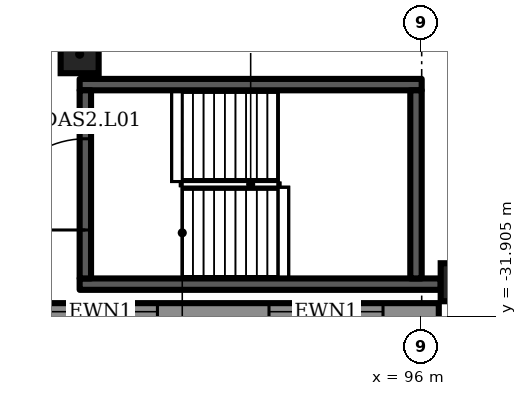
"""IFC4 building model, lengths in metres.
Left out: names, types, materials, properties, quantities, classifications, styles, units other than length and angle.
Written with IfcOpenShell. Run it as: python <this file> out.ifc"""

import sys

from ifc_helpers import new_model, si_unit, direction, frame, frame_2d, origin, origin_2d, place, context, subcontext, project, spatial, rectangle, extrude, element, fill, save


model = new_model("IFC4")
c1 = context("Model", 3, precision=1e-05, world=origin(), true_north=direction((0.0, 1.0)))
c2 = subcontext(c1, "Body", "Model", "MODEL_VIEW")
j1 = project(units=[si_unit("LENGTHUNIT", "METRE"), si_unit("PLANEANGLEUNIT", "RADIAN")], contexts=[c1])
p1 = place(None, origin())
s1 = spatial("IfcSite", under=j1, at=p1, CompositionType="ELEMENT")
p2 = place(p1, origin())
s2 = spatial("IfcBuilding", under=s1, at=p2, CompositionType="ELEMENT")
p3 = place(p2, frame((0.0, 0.0, 8.0)))
s3 = spatial("IfcBuildingStorey", under=s2, at=p3, CompositionType="ELEMENT", Elevation=8.0)
for number, where, z_axis, x_axis in (
    (1, (97.0, -31.0, 0.0), (0.0, 0.0, 1.0), (1.0, 0.0, 0.0)),
    (2, (87.0, -25.0, 0.0), (0.0, 0.0, 1.0), (1.0, 0.0, 0.0)),
):
    element("IfcColumn", number, at=place(p3, frame(where, z_axis=z_axis, x_axis=x_axis)), inside=s3, PredefinedType="COLUMN", context=c2, shape_type="SweptSolid", body=[
        extrude(rectangle(XDim=1.0, YDim=1.0, at=origin_2d()), origin(), (0.0, 0.0, 1.0), 7.0),
    ])
p4 = place(p3, frame((-4.45, -31.775, 0.0), z_axis=(0.0, 0.0, 1.0), x_axis=(1.0, 0.0, 0.0)))
e3 = element("IfcWall", 3, at=p4, inside=s3, PredefinedType="SOLIDWALL", context=c2, shape_type="SweptSolid", body=[
    extrude(rectangle(XDim=100.9, YDim=0.45, at=frame_2d((50.45, 0.0))), origin(), (0.0, 0.0, 1.0), 6.7),
])
p5 = place(p4, frame((1.468, 0.0, 1.0)))
e4 = element("IfcOpeningElement", 4, at=p5, cuts=e3, PredefinedType="OPENING", context=c2, shape_type="SweptSolid", body=[
    extrude(rectangle(XDim=3.0, YDim=4.7, at=frame_2d((1.5, 2.35))), frame((0.0, 0.235, 0.0), z_axis=(0.0, -1.0, 0.0), x_axis=(1.0, 0.0, 0.0)), (0.0, 0.0, 1.0), 0.47),
])
p6 = place(p4, frame((7.403, 0.0, 1.0)))
e5 = element("IfcOpeningElement", 5, at=p6, cuts=e3, PredefinedType="OPENING", context=c2, shape_type="SweptSolid", body=[
    extrude(rectangle(XDim=3.0, YDim=4.7, at=frame_2d((1.5, 2.35))), frame((0.0, 0.235, 0.0), z_axis=(0.0, -1.0, 0.0), x_axis=(1.0, 0.0, 0.0)), (0.0, 0.0, 1.0), 0.47),
])
p7 = place(p4, frame((13.338, 0.0, 1.0)))
e6 = element("IfcOpeningElement", 6, at=p7, cuts=e3, PredefinedType="OPENING", context=c2, shape_type="SweptSolid", body=[
    extrude(rectangle(XDim=3.0, YDim=4.7, at=frame_2d((1.5, 2.35))), frame((0.0, 0.235, 0.0), z_axis=(0.0, -1.0, 0.0), x_axis=(1.0, 0.0, 0.0)), (0.0, 0.0, 1.0), 0.47),
])
p8 = place(p4, frame((19.273, 0.0, 1.0)))
e7 = element("IfcOpeningElement", 7, at=p8, cuts=e3, PredefinedType="OPENING", context=c2, shape_type="SweptSolid", body=[
    extrude(rectangle(XDim=3.0, YDim=4.7, at=frame_2d((1.5, 2.35))), frame((0.0, 0.235, 0.0), z_axis=(0.0, -1.0, 0.0), x_axis=(1.0, 0.0, 0.0)), (0.0, 0.0, 1.0), 0.47),
])
p9 = place(p4, frame((25.209, 0.0, 1.0)))
e8 = element("IfcOpeningElement", 8, at=p9, cuts=e3, PredefinedType="OPENING", context=c2, shape_type="SweptSolid", body=[
    extrude(rectangle(XDim=3.0, YDim=4.7, at=frame_2d((1.5, 2.35))), frame((0.0, 0.235, 0.0), z_axis=(0.0, -1.0, 0.0), x_axis=(1.0, 0.0, 0.0)), (0.0, 0.0, 1.0), 0.47),
])
p10 = place(p4, frame((31.144, 0.0, 1.0)))
e9 = element("IfcOpeningElement", 9, at=p10, cuts=e3, PredefinedType="OPENING", context=c2, shape_type="SweptSolid", body=[
    extrude(rectangle(XDim=3.0, YDim=4.7, at=frame_2d((1.5, 2.35))), frame((0.0, 0.235, 0.0), z_axis=(0.0, -1.0, 0.0), x_axis=(1.0, 0.0, 0.0)), (0.0, 0.0, 1.0), 0.47),
])
p11 = place(p4, frame((37.079, 0.0, 1.0)))
e10 = element("IfcOpeningElement", 10, at=p11, cuts=e3, PredefinedType="OPENING", context=c2, shape_type="SweptSolid", body=[
    extrude(rectangle(XDim=3.0, YDim=4.7, at=frame_2d((1.5, 2.35))), frame((0.0, 0.235, 0.0), z_axis=(0.0, -1.0, 0.0), x_axis=(1.0, 0.0, 0.0)), (0.0, 0.0, 1.0), 0.47),
])
p12 = place(p4, frame((43.015, 0.0, 1.0)))
e11 = element("IfcOpeningElement", 11, at=p12, cuts=e3, PredefinedType="OPENING", context=c2, shape_type="SweptSolid", body=[
    extrude(rectangle(XDim=3.0, YDim=4.7, at=frame_2d((1.5, 2.35))), frame((0.0, 0.235, 0.0), z_axis=(0.0, -1.0, 0.0), x_axis=(1.0, 0.0, 0.0)), (0.0, 0.0, 1.0), 0.47),
])
p13 = place(p4, frame((48.95, 0.0, 1.0)))
e12 = element("IfcOpeningElement", 12, at=p13, cuts=e3, PredefinedType="OPENING", context=c2, shape_type="SweptSolid", body=[
    extrude(rectangle(XDim=3.0, YDim=4.7, at=frame_2d((1.5, 2.35))), frame((0.0, 0.235, 0.0), z_axis=(0.0, -1.0, 0.0), x_axis=(1.0, 0.0, 0.0)), (0.0, 0.0, 1.0), 0.47),
])
p14 = place(p4, frame((54.885, 0.0, 1.0)))
e13 = element("IfcOpeningElement", 13, at=p14, cuts=e3, PredefinedType="OPENING", context=c2, shape_type="SweptSolid", body=[
    extrude(rectangle(XDim=3.0, YDim=4.7, at=frame_2d((1.5, 2.35))), frame((0.0, 0.235, 0.0), z_axis=(0.0, -1.0, 0.0), x_axis=(1.0, 0.0, 0.0)), (0.0, 0.0, 1.0), 0.47),
])
p15 = place(p4, frame((60.821, 0.0, 1.0)))
e14 = element("IfcOpeningElement", 14, at=p15, cuts=e3, PredefinedType="OPENING", context=c2, shape_type="SweptSolid", body=[
    extrude(rectangle(XDim=3.0, YDim=4.7, at=frame_2d((1.5, 2.35))), frame((0.0, 0.235, 0.0), z_axis=(0.0, -1.0, 0.0), x_axis=(1.0, 0.0, 0.0)), (0.0, 0.0, 1.0), 0.47),
])
p16 = place(p4, frame((66.756, 0.0, 1.0)))
e15 = element("IfcOpeningElement", 15, at=p16, cuts=e3, PredefinedType="OPENING", context=c2, shape_type="SweptSolid", body=[
    extrude(rectangle(XDim=3.0, YDim=4.7, at=frame_2d((1.5, 2.35))), frame((0.0, 0.235, 0.0), z_axis=(0.0, -1.0, 0.0), x_axis=(1.0, 0.0, 0.0)), (0.0, 0.0, 1.0), 0.47),
])
p17 = place(p4, frame((72.691, 0.0, 1.0)))
e16 = element("IfcOpeningElement", 16, at=p17, cuts=e3, PredefinedType="OPENING", context=c2, shape_type="SweptSolid", body=[
    extrude(rectangle(XDim=3.0, YDim=4.7, at=frame_2d((1.5, 2.35))), frame((0.0, 0.235, 0.0), z_axis=(0.0, -1.0, 0.0), x_axis=(1.0, 0.0, 0.0)), (0.0, 0.0, 1.0), 0.47),
])
p18 = place(p4, frame((78.626, 0.0, 1.0)))
e17 = element("IfcOpeningElement", 17, at=p18, cuts=e3, PredefinedType="OPENING", context=c2, shape_type="SweptSolid", body=[
    extrude(rectangle(XDim=3.0, YDim=4.7, at=frame_2d((1.5, 2.35))), frame((0.0, 0.235, 0.0), z_axis=(0.0, -1.0, 0.0), x_axis=(1.0, 0.0, 0.0)), (0.0, 0.0, 1.0), 0.47),
])
p19 = place(p4, frame((84.562, 0.0, 1.0)))
e18 = element("IfcOpeningElement", 18, at=p19, cuts=e3, PredefinedType="OPENING", context=c2, shape_type="SweptSolid", body=[
    extrude(rectangle(XDim=3.0, YDim=4.7, at=frame_2d((1.5, 2.35))), frame((0.0, 0.235, 0.0), z_axis=(0.0, -1.0, 0.0), x_axis=(1.0, 0.0, 0.0)), (0.0, 0.0, 1.0), 0.47),
])
p20 = place(p4, frame((90.497, 0.0, 1.0)))
e19 = element("IfcOpeningElement", 19, at=p20, cuts=e3, PredefinedType="OPENING", context=c2, shape_type="SweptSolid", body=[
    extrude(rectangle(XDim=3.0, YDim=4.7, at=frame_2d((1.5, 2.35))), frame((0.0, 0.235, 0.0), z_axis=(0.0, -1.0, 0.0), x_axis=(1.0, 0.0, 0.0)), (0.0, 0.0, 1.0), 0.47),
])
p21 = place(p4, frame((96.432, 0.0, 1.0)))
e20 = element("IfcOpeningElement", 20, at=p21, cuts=e3, PredefinedType="OPENING", context=c2, shape_type="SweptSolid", body=[
    extrude(rectangle(XDim=3.0, YDim=4.7, at=frame_2d((1.5, 2.35))), frame((0.0, 0.235, 0.0), z_axis=(0.0, -1.0, 0.0), x_axis=(1.0, 0.0, 0.0)), (0.0, 0.0, 1.0), 0.47),
])
p22 = place(p3, frame((87.0, -31.05, 0.0), z_axis=(0.0, 0.0, 1.0), x_axis=(1.0, 0.0, 0.0)))
e21 = element("IfcWall", 21, at=p22, inside=s3, PredefinedType="SHEAR", context=c2, shape_type="SweptSolid", body=[
    extrude(rectangle(XDim=9.5, YDim=0.3, at=frame_2d((4.75, 0.0))), origin(), (0.0, 0.0, 1.0), 6.7),
])
p23 = place(p3, frame((87.0, -25.8, 0.0), z_axis=(0.0, 0.0, 1.0), x_axis=(1.0, 0.0, 0.0)))
e22 = element("IfcWall", 22, at=p23, inside=s3, PredefinedType="SHEAR", context=c2, shape_type="SweptSolid", body=[
    extrude(rectangle(XDim=9.0, YDim=0.3, at=frame_2d((4.5, 0.0))), origin(), (0.0, 0.0, 1.0), 6.7),
])
p24 = place(p3, frame((87.15, -30.9, 0.0), z_axis=(0.0, 0.0, 1.0), x_axis=(0.0, 1.0, 0.0)))
e23 = element("IfcWall", 23, at=p24, inside=s3, PredefinedType="SHEAR", context=c2, shape_type="SweptSolid", body=[
    extrude(rectangle(XDim=4.95, YDim=0.3, at=frame_2d((2.475, 0.0))), origin(), (0.0, 0.0, 1.0), 6.7),
])
p25 = place(p24, frame((1.275, 0.0, 0.0)))
e24 = element("IfcOpeningElement", 24, at=p25, cuts=e23, PredefinedType="OPENING", context=c2, shape_type="SweptSolid", body=[
    extrude(rectangle(XDim=2.4, YDim=2.1, at=frame_2d((1.2, 1.05))), frame((0.0, 0.16, 0.0), z_axis=(0.0, -1.0, 0.0), x_axis=(1.0, 0.0, 0.0)), (0.0, 0.0, 1.0), 0.32),
])
p26 = place(p3, frame((95.85, -30.9, 0.0), z_axis=(0.0, 0.0, 1.0), x_axis=(0.0, 1.0, 0.0)))
e25 = element("IfcWall", 25, at=p26, inside=s3, PredefinedType="SHEAR", context=c2, shape_type="SweptSolid", body=[
    extrude(rectangle(XDim=4.95, YDim=0.3, at=frame_2d((2.475, 0.0))), origin(), (0.0, 0.0, 1.0), 6.7),
])
p27 = place(p20, origin())
e26 = element("IfcWindow", 26, at=p27, inside=s3, PartitioningType="SINGLE_PANEL", PredefinedType="WINDOW", context=c2, shape_type="SweptSolid", body=[
    extrude(rectangle(XDim=3.0, YDim=4.7, at=frame_2d((1.5, 2.35))), frame((0.0, 0.105, 0.0), z_axis=(0.0, -1.0, 0.0), x_axis=(1.0, 0.0, 0.0)), (0.0, 0.0, 1.0), 0.06),
])
fill(e19, e26)
p28 = place(p21, origin())
e27 = element("IfcWindow", 27, at=p28, inside=s3, PartitioningType="SINGLE_PANEL", PredefinedType="WINDOW", context=c2, shape_type="SweptSolid", body=[
    extrude(rectangle(XDim=3.0, YDim=4.7, at=frame_2d((1.5, 2.35))), frame((0.0, 0.105, 0.0), z_axis=(0.0, -1.0, 0.0), x_axis=(1.0, 0.0, 0.0)), (0.0, 0.0, 1.0), 0.06),
])
fill(e20, e27)
p29 = place(p25, origin())
e28 = element("IfcDoor", 28, at=p29, inside=s3, OperationType="DOUBLE_DOOR_SINGLE_SWING", PredefinedType="DOOR", context=c2, shape_type="SweptSolid", body=[
    extrude(rectangle(XDim=2.4, YDim=2.1, at=frame_2d((1.2, 1.05))), frame((0.0, 0.025, 0.0), z_axis=(0.0, -1.0, 0.0), x_axis=(1.0, 0.0, 0.0)), (0.0, 0.0, 1.0), 0.05),
])
fill(e24, e28)
save(model, sys.argv[1])
